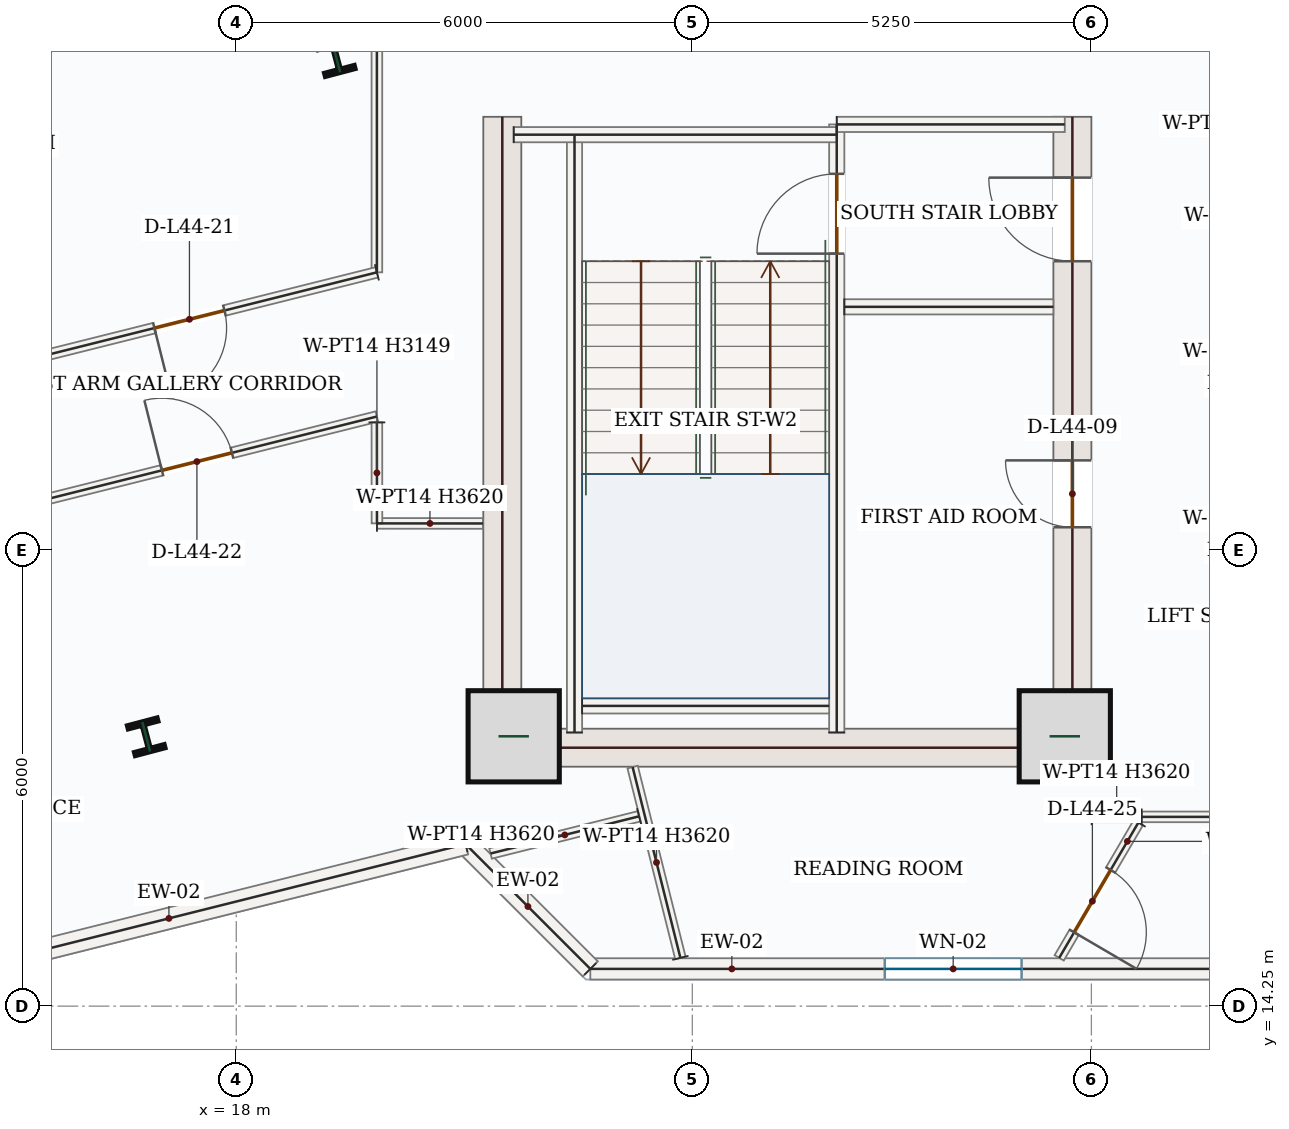
"""IFC4 building model, lengths in metres.
Left out: names, types, materials, properties, quantities, classifications, styles, units other than length and angle.
Written with IfcOpenShell. Run it as: python <this file> out.ifc"""

import sys

from ifc_helpers import new_model, si_unit, direction, frame, frame_2d, origin, origin_2d, place, context, subcontext, project, spatial, rectangle, i_section, extrude, source, transform, mapped, element, fill, save


model = new_model("IFC4")
c1 = context("Model", 3, precision=1e-05, world=origin(), true_north=direction((0.0, 1.0)))
c2 = subcontext(c1, "Body", "Model", "MODEL_VIEW")
j1 = project(units=[si_unit("LENGTHUNIT", "METRE"), si_unit("PLANEANGLEUNIT", "RADIAN")], contexts=[c1])
p1 = place(None, origin())
s1 = spatial("IfcSite", under=j1, at=p1, CompositionType="ELEMENT")
p2 = place(p1, origin())
s2 = spatial("IfcBuilding", under=s1, at=p2, CompositionType="ELEMENT")
p3 = place(p2, frame((0.0, 0.0, 190.2)))
s3 = spatial("IfcBuildingStorey", under=s2, at=p3, CompositionType="ELEMENT", Elevation=190.2)
m1 = source(origin(), c2, "Body", "SweptSolid", [
    extrude(rectangle(XDim=8.55, YDim=0.5, at=frame_2d((4.275, 0.0))), origin(), (0.0, 0.0, 1.0), 3.62),
])
p4 = place(p3, frame((21.5, 17.4, 0.0), z_axis=(0.0, 0.0, 1.0), x_axis=(0.0, 1.0, 0.0)))
e1 = element("IfcWall", 1, at=p4, inside=s3, PredefinedType="SHEAR", context=c2, shape_type="MappedRepresentation", body=[
    mapped(m1, transform((0.0, 0.0, 0.0), x_axis=(1.0, 0.0, 0.0), y_axis=(0.0, 1.0, 0.0), z_axis=(0.0, 0.0, 1.0), scale=1.0)),
])
p5 = place(p3, frame((29.0, 17.4, 0.0), z_axis=(0.0, 0.0, 1.0), x_axis=(0.0, 1.0, 0.0)))
e2 = element("IfcWall", 2, at=p5, inside=s3, PredefinedType="SHEAR", context=c2, shape_type="SweptSolid", body=[
    extrude(rectangle(XDim=8.55, YDim=0.5, at=frame_2d((4.275, 0.0))), origin(), (0.0, 0.0, 1.0), 3.62),
])
p6 = place(p5, frame((6.65, 0.0, 0.0)))
e3 = element("IfcOpeningElement", 3, at=p6, cuts=e2, PredefinedType="OPENING", context=c2, shape_type="SweptSolid", body=[
    extrude(rectangle(XDim=1.1, YDim=2.2, at=frame_2d((0.55, 1.1))), frame((0.0, 0.26, 0.0), z_axis=(0.0, -1.0, 0.0), x_axis=(1.0, 0.0, 0.0)), (0.0, 0.0, 1.0), 0.52),
])
p7 = place(p5, frame((3.15, 0.0, 0.0)))
e4 = element("IfcOpeningElement", 4, at=p7, cuts=e2, PredefinedType="OPENING", context=c2, shape_type="SweptSolid", body=[
    extrude(rectangle(XDim=0.88, YDim=2.1, at=frame_2d((0.44, 1.05))), frame((0.0, 0.26, 0.0), z_axis=(0.0, -1.0, 0.0), x_axis=(1.0, 0.0, 0.0)), (0.0, 0.0, 1.0), 0.52),
])
m2 = source(origin(), c2, "Body", "SweptSolid", [
    extrude(rectangle(XDim=7.0, YDim=0.5, at=frame_2d((3.5, 0.0))), origin(), (0.0, 0.0, 1.0), 3.62),
])
p8 = place(p3, frame((21.75, 17.65, 0.0), z_axis=(0.0, 0.0, 1.0), x_axis=(1.0, 0.0, 0.0)))
e5 = element("IfcWall", 5, at=p8, inside=s3, PredefinedType="SHEAR", context=c2, shape_type="MappedRepresentation", body=[
    mapped(m2, transform((0.0, 0.0, 0.0), x_axis=(1.0, 0.0, 0.0), y_axis=(0.0, 1.0, 0.0), z_axis=(0.0, 0.0, 1.0), scale=1.0)),
])
m3 = source(origin(), c2, "Body", "SweptSolid", [
    extrude(rectangle(XDim=1.2, YDim=1.2, at=origin_2d()), origin(), (0.0, 0.0, 1.0), 3.9),
])
for number, where, z_axis, x_axis in (
    (6, (21.65, 17.8, 0.0), (0.0, 0.0, 1.0), (1.0, 0.0, 0.0)),
    (7, (28.9, 17.8, 0.0), (0.0, 0.0, 1.0), (1.0, 0.0, 0.0)),
):
    element("IfcColumn", number, at=place(p3, frame(where, z_axis=z_axis, x_axis=x_axis)), inside=s3, PredefinedType="COLUMN", context=c2, shape_type="MappedRepresentation", body=[
        mapped(m3, transform((0.0, 0.0, 0.0), x_axis=(1.0, 0.0, 0.0), y_axis=(0.0, 1.0, 0.0), z_axis=(0.0, 0.0, 1.0), scale=1.0)),
    ])
m4 = source(origin(), c2, "Body", "SweptSolid", [
    extrude(i_section(OverallWidth=0.404, OverallDepth=0.407, WebThickness=0.027, FlangeThickness=0.044, FilletRadius=0.018, at=origin_2d()), origin(), (0.0, 0.0, 1.0), 3.9),
])
for number, where, z_axis, x_axis in (
    (8, (19.316, 26.729, 0.0), (0.0, 0.0, 1.0), (0.967, 0.255, 0.0)),
    (9, (16.815, 17.794, 0.0), (0.0, 0.0, 1.0), (0.967, 0.255, 0.0)),
):
    element("IfcColumn", number, at=place(p3, frame(where, z_axis=z_axis, x_axis=x_axis)), inside=s3, PredefinedType="COLUMN", context=c2, shape_type="MappedRepresentation", body=[
        mapped(m4, transform((0.0, 0.0, 0.0), x_axis=(1.0, 0.0, 0.0), y_axis=(0.0, 1.0, 0.0), z_axis=(0.0, 0.0, 1.0), scale=1.0)),
    ])
p9 = place(p3, frame((32.205, 14.74, 0.0), z_axis=(0.0, 0.0, 1.0), x_axis=(-1.0, 0.0, 0.0)))
e10 = element("IfcWall", 10, at=p9, inside=s3, PredefinedType="SOLIDWALL", context=c2, shape_type="SweptSolid", body=[
    extrude(rectangle(XDim=9.547, YDim=0.28, at=frame_2d((4.773, 0.0))), origin(), (0.0, 0.0, 1.0), 3.62),
])
p10 = place(p9, frame((3.873, 0.0, 0.85)))
e11 = element("IfcOpeningElement", 11, at=p10, cuts=e10, PredefinedType="OPENING", context=c2, shape_type="SweptSolid", body=[
    extrude(rectangle(XDim=1.8, YDim=1.75, at=frame_2d((0.9, 0.875))), frame((0.0, 0.15, 0.0), z_axis=(0.0, -1.0, 0.0), x_axis=(1.0, 0.0, 0.0)), (0.0, 0.0, 1.0), 0.3),
])
m5 = source(origin(), c2, "Body", "SweptSolid", [
    extrude(rectangle(XDim=2.322, YDim=0.28, at=frame_2d((1.161, 0.0))), origin(), (0.0, 0.0, 1.0), 3.62),
])
p11 = place(p3, frame((22.658, 14.74, 0.0), z_axis=(0.0, 0.0, 1.0), x_axis=(-0.707106781187, 0.707106781187, 0.0)))
e12 = element("IfcWall", 12, at=p11, inside=s3, PredefinedType="SOLIDWALL", context=c2, shape_type="MappedRepresentation", body=[
    mapped(m5, transform((0.0, 0.0, 0.0), x_axis=(1.0, 0.0, 0.0), y_axis=(0.0, 1.0, 0.0), z_axis=(0.0, 0.0, 1.0), scale=1.0)),
])
m6 = source(origin(), c2, "Body", "SweptSolid", [
    extrude(rectangle(XDim=8.045, YDim=0.28, at=frame_2d((4.023, 0.0))), origin(), (0.0, 0.0, 1.0), 3.62),
])
p12 = place(p3, frame((21.016, 16.382, 0.0), z_axis=(0.0, 0.0, 1.0), x_axis=(-0.970040669564, -0.242942584557, 0.0)))
e13 = element("IfcWall", 13, at=p12, inside=s3, PredefinedType="SOLIDWALL", context=c2, shape_type="MappedRepresentation", body=[
    mapped(m6, transform((0.0, 0.0, 0.0), x_axis=(1.0, 0.0, 0.0), y_axis=(0.0, 1.0, 0.0), z_axis=(0.0, 0.0, 1.0), scale=1.0)),
])
m7 = source(origin(), c2, "Body", "SweptSolid", [
    extrude(rectangle(XDim=7.87, YDim=0.2, at=frame_2d((3.935, 0.0))), origin(), (0.0, 0.0, 1.0), 3.62),
])
p13 = place(p3, frame((22.45, 17.85, 0.0), z_axis=(0.0, 0.0, 1.0), x_axis=(0.0, 1.0, 0.0)))
e14 = element("IfcWall", 14, at=p13, inside=s3, PredefinedType="SOLIDWALL", context=c2, shape_type="MappedRepresentation", body=[
    mapped(m7, transform((0.0, 0.0, 0.0), x_axis=(1.0, 0.0, 0.0), y_axis=(0.0, 1.0, 0.0), z_axis=(0.0, 0.0, 1.0), scale=1.0)),
])
p14 = place(p3, frame((25.9, 17.85, 0.0), z_axis=(0.0, 0.0, 1.0), x_axis=(0.0, 1.0, 0.0)))
e15 = element("IfcWall", 15, at=p14, inside=s3, PredefinedType="SOLIDWALL", context=c2, shape_type="SweptSolid", body=[
    extrude(rectangle(XDim=8.0, YDim=0.2, at=frame_2d((4.0, 0.0))), origin(), (0.0, 0.0, 1.0), 3.62),
])
p15 = place(p14, frame((6.3, 0.0, 0.0)))
e16 = element("IfcOpeningElement", 16, at=p15, cuts=e15, PredefinedType="OPENING", context=c2, shape_type="SweptSolid", body=[
    extrude(rectangle(XDim=1.05, YDim=2.15, at=frame_2d((0.525, 1.075))), frame((0.0, 0.11, 0.0), z_axis=(0.0, -1.0, 0.0), x_axis=(1.0, 0.0, 0.0)), (0.0, 0.0, 1.0), 0.22),
])
m8 = source(origin(), c2, "Body", "SweptSolid", [
    extrude(rectangle(XDim=4.25, YDim=0.2, at=frame_2d((2.125, 0.0))), origin(), (0.0, 0.0, 1.0), 3.62),
])
p16 = place(p3, frame((21.65, 25.715, 0.0), z_axis=(0.0, 0.0, 1.0), x_axis=(1.0, 0.0, 0.0)))
e17 = element("IfcWall", 17, at=p16, inside=s3, PredefinedType="SOLIDWALL", context=c2, shape_type="MappedRepresentation", body=[
    mapped(m8, transform((0.0, 0.0, 0.0), x_axis=(1.0, 0.0, 0.0), y_axis=(0.0, 1.0, 0.0), z_axis=(0.0, 0.0, 1.0), scale=1.0)),
])
m9 = source(origin(), c2, "Body", "SweptSolid", [
    extrude(rectangle(XDim=3.0, YDim=0.2, at=frame_2d((1.5, 0.0))), origin(), (0.0, 0.0, 1.0), 3.62),
])
p17 = place(p3, frame((25.9, 25.85, 0.0), z_axis=(0.0, 0.0, 1.0), x_axis=(1.0, 0.0, 0.0)))
e18 = element("IfcWall", 18, at=p17, inside=s3, PredefinedType="SOLIDWALL", context=c2, shape_type="MappedRepresentation", body=[
    mapped(m9, transform((0.0, 0.0, 0.0), x_axis=(1.0, 0.0, 0.0), y_axis=(0.0, 1.0, 0.0), z_axis=(0.0, 0.0, 1.0), scale=1.0)),
])
m10 = source(origin(), c2, "Body", "SweptSolid", [
    extrude(rectangle(XDim=3.25, YDim=0.2, at=frame_2d((1.625, 0.0))), origin(), (0.0, 0.0, 1.0), 3.62),
])
p18 = place(p3, frame((22.55, 18.2, 0.0), z_axis=(0.0, 0.0, 1.0), x_axis=(1.0, 0.0, 0.0)))
e19 = element("IfcWall", 19, at=p18, inside=s3, PredefinedType="SOLIDWALL", context=c2, shape_type="MappedRepresentation", body=[
    mapped(m10, transform((0.0, 0.0, 0.0), x_axis=(1.0, 0.0, 0.0), y_axis=(0.0, 1.0, 0.0), z_axis=(0.0, 0.0, 1.0), scale=1.0)),
])
m11 = source(origin(), c2, "Body", "SweptSolid", [
    extrude(rectangle(XDim=2.75, YDim=0.2, at=frame_2d((1.375, 0.0))), origin(), (0.0, 0.0, 1.0), 3.62),
])
p19 = place(p3, frame((26.0, 23.45, 0.0), z_axis=(0.0, 0.0, 1.0), x_axis=(1.0, 0.0, 0.0)))
e20 = element("IfcWall", 20, at=p19, inside=s3, PredefinedType="SOLIDWALL", context=c2, shape_type="MappedRepresentation", body=[
    mapped(m11, transform((0.0, 0.0, 0.0), x_axis=(1.0, 0.0, 0.0), y_axis=(0.0, 1.0, 0.0), z_axis=(0.0, 0.0, 1.0), scale=1.0)),
])
m12 = source(origin(), c2, "Body", "SweptSolid", [
    extrude(rectangle(XDim=0.659, YDim=0.14, at=frame_2d((0.329, 0.0))), origin(), (0.0, 0.0, 1.0), 3.62),
])
p20 = place(p3, frame((29.253, 16.74, 0.0), z_axis=(0.0, 0.0, 1.0), x_axis=(0.999999725245, -0.000741289641, 0.0)))
e21 = element("IfcWall", 21, at=p20, inside=s3, PredefinedType="PARTITIONING", context=c2, shape_type="MappedRepresentation", body=[
    mapped(m12, transform((0.0, 0.0, 0.0), x_axis=(1.0, 0.0, 0.0), y_axis=(0.0, 1.0, 0.0), z_axis=(0.0, 0.0, 1.0), scale=1.0)),
])
p21 = place(p3, frame((29.868, 16.665, 0.0), z_axis=(0.0, 0.0, 1.0), x_axis=(-0.505011455642, -0.863112640198, 0.0)))
e22 = element("IfcWall", 22, at=p21, inside=s3, PredefinedType="PARTITIONING", context=c2, shape_type="SweptSolid", body=[
    extrude(rectangle(XDim=2.062, YDim=0.14, at=frame_2d((1.031, 0.0))), origin(), (0.0, 0.0, 1.0), 3.62),
])
p22 = place(p21, frame((0.723, 0.0, 0.0)))
e23 = element("IfcOpeningElement", 23, at=p22, cuts=e22, PredefinedType="OPENING", context=c2, shape_type="SweptSolid", body=[
    extrude(rectangle(XDim=0.95, YDim=2.15, at=frame_2d((0.475, 1.075))), frame((0.0, 0.08, 0.0), z_axis=(0.0, -1.0, 0.0), x_axis=(1.0, 0.0, 0.0)), (0.0, 0.0, 1.0), 0.16),
])
m13 = source(origin(), c2, "Body", "SweptSolid", [
    extrude(rectangle(XDim=2.588, YDim=0.14, at=frame_2d((1.294, 0.0))), origin(), (0.0, 0.0, 1.0), 3.62),
])
p23 = place(p3, frame((23.843, 14.885, 0.0), z_axis=(0.0, 0.0, 1.0), x_axis=(-0.242957412811, 0.97003695577, 0.0)))
e24 = element("IfcWall", 24, at=p23, inside=s3, PredefinedType="PARTITIONING", context=c2, shape_type="MappedRepresentation", body=[
    mapped(m13, transform((0.0, 0.0, 0.0), x_axis=(1.0, 0.0, 0.0), y_axis=(0.0, 1.0, 0.0), z_axis=(0.0, 0.0, 1.0), scale=1.0)),
])
m14 = source(origin(), c2, "Body", "SweptSolid", [
    extrude(rectangle(XDim=1.394, YDim=0.14, at=frame_2d((0.697, 0.0))), origin(), (0.0, 0.0, 1.0), 3.62),
])
p24 = place(p3, frame((19.851, 20.601, 0.0), z_axis=(0.0, 0.0, 1.0), x_axis=(0.999999754632, -0.000700525222, 0.0)))
e25 = element("IfcWall", 25, at=p24, inside=s3, PredefinedType="PARTITIONING", context=c2, shape_type="MappedRepresentation", body=[
    mapped(m14, transform((0.0, 0.0, 0.0), x_axis=(1.0, 0.0, 0.0), y_axis=(0.0, 1.0, 0.0), z_axis=(0.0, 0.0, 1.0), scale=1.0)),
])
m15 = source(origin(), c2, "Body", "SweptSolid", [
    extrude(rectangle(XDim=2.014, YDim=0.14, at=frame_2d((1.007, 0.0))), origin(), (0.0, 0.0, 1.0), 3.62),
])
p25 = place(p3, frame((23.299, 16.747, 0.0), z_axis=(0.0, 0.0, 1.0), x_axis=(-0.970056889313, -0.242877811867, 0.0)))
e26 = element("IfcWall", 26, at=p25, inside=s3, PredefinedType="PARTITIONING", context=c2, shape_type="MappedRepresentation", body=[
    mapped(m15, transform((0.0, 0.0, 0.0), x_axis=(1.0, 0.0, 0.0), y_axis=(0.0, 1.0, 0.0), z_axis=(0.0, 0.0, 1.0), scale=1.0)),
])
p26 = place(p3, frame((10.26, 19.605, 0.0), z_axis=(0.0, 0.0, 1.0), x_axis=(0.970042179759, 0.242936554451, 0.0)))
e27 = element("IfcWall", 27, at=p26, inside=s3, PredefinedType="PARTITIONING", context=c2, shape_type="SweptSolid", body=[
    extrude(rectangle(XDim=9.886, YDim=0.14, at=frame_2d((4.943, 0.0))), origin(), (0.0, 0.0, 1.0), 3.62),
])
p27 = place(p26, frame((6.97, 0.0, 0.0)))
e28 = element("IfcOpeningElement", 28, at=p27, cuts=e27, PredefinedType="OPENING", context=c2, shape_type="SweptSolid", body=[
    extrude(rectangle(XDim=0.95, YDim=2.15, at=frame_2d((0.475, 1.075))), frame((0.0, 0.08, 0.0), z_axis=(0.0, -1.0, 0.0), x_axis=(1.0, 0.0, 0.0)), (0.0, 0.0, 1.0), 0.16),
])
m16 = source(origin(), c2, "Body", "SweptSolid", [
    extrude(rectangle(XDim=1.329, YDim=0.14, at=frame_2d((0.664, 0.0))), origin(), (0.0, 0.0, 1.0), 3.149),
])
p28 = place(p3, frame((19.85, 21.93, 0.0), z_axis=(0.0, 0.0, 1.0), x_axis=(0.00073502369, -0.99999972987, 0.0)))
e29 = element("IfcWall", 29, at=p28, inside=s3, PredefinedType="PARTITIONING", context=c2, shape_type="MappedRepresentation", body=[
    mapped(m16, transform((0.0, 0.0, 0.0), x_axis=(1.0, 0.0, 0.0), y_axis=(0.0, 1.0, 0.0), z_axis=(0.0, 0.0, 1.0), scale=1.0)),
])
m17 = source(origin(), c2, "Body", "SweptSolid", [
    extrude(rectangle(XDim=6.046, YDim=0.14, at=frame_2d((3.023, 0.0))), origin(), (0.0, 0.0, 1.0), 2.766),
])
p29 = place(p3, frame((19.85, 29.95, 0.0), z_axis=(0.0, 0.0, 1.0), x_axis=(0.0, -1.0, 0.0)))
e30 = element("IfcWall", 30, at=p29, inside=s3, PredefinedType="PARTITIONING", context=c2, shape_type="MappedRepresentation", body=[
    mapped(m17, transform((0.0, 0.0, 0.0), x_axis=(1.0, 0.0, 0.0), y_axis=(0.0, 1.0, 0.0), z_axis=(0.0, 0.0, 1.0), scale=1.0)),
])
p30 = place(p3, frame((19.85, 23.904, 0.0), z_axis=(0.0, 0.0, 1.0), x_axis=(-0.97004665335, -0.24291869077, 0.0)))
e31 = element("IfcWall", 31, at=p30, inside=s3, PredefinedType="PARTITIONING", context=c2, shape_type="SweptSolid", body=[
    extrude(rectangle(XDim=10.347, YDim=0.14, at=frame_2d((5.173, 0.0))), origin(), (0.0, 0.0, 1.0), 3.62),
])
p31 = place(p30, frame((2.067, 0.0, 0.0)))
e32 = element("IfcOpeningElement", 32, at=p31, cuts=e31, PredefinedType="OPENING", context=c2, shape_type="SweptSolid", body=[
    extrude(rectangle(XDim=0.95, YDim=2.15, at=frame_2d((0.475, 1.075))), frame((0.0, 0.08, 0.0), z_axis=(0.0, -1.0, 0.0), x_axis=(1.0, 0.0, 0.0)), (0.0, 0.0, 1.0), 0.16),
])
p32 = place(p3, frame((29.912, 16.74, 0.0), z_axis=(0.0, 0.0, 1.0), x_axis=(1.0, 0.0, 0.0)))
e33 = element("IfcWall", 33, at=p32, inside=s3, PredefinedType="PARTITIONING", context=c2, shape_type="SweptSolid", body=[
    extrude(rectangle(XDim=7.806, YDim=0.14, at=frame_2d((3.903, 0.0))), origin(), (0.0, 0.0, 1.0), 3.62),
])
p33 = place(p32, frame((5.348, 0.0, 0.0)))
e34 = element("IfcOpeningElement", 34, at=p33, cuts=e33, PredefinedType="OPENING", context=c2, shape_type="SweptSolid", body=[
    extrude(rectangle(XDim=0.95, YDim=2.15, at=frame_2d((0.475, 1.075))), frame((0.0, 0.08, 0.0), z_axis=(0.0, -1.0, 0.0), x_axis=(1.0, 0.0, 0.0)), (0.0, 0.0, 1.0), 0.16),
])
m18 = source(origin(), c2, "Body", "SweptSolid", [
    extrude(rectangle(XDim=1.8, YDim=1.75, at=frame_2d((0.9, 0.875))), frame((0.0, 0.03, 0.0), z_axis=(0.0, -1.0, 0.0), x_axis=(1.0, 0.0, 0.0)), (0.0, 0.0, 1.0), 0.06),
])
p34 = place(p10, origin())
e35 = element("IfcWindow", 35, at=p34, inside=s3, PartitioningType="DOUBLE_PANEL_VERTICAL", PredefinedType="WINDOW", context=c2, shape_type="MappedRepresentation", body=[
    mapped(m18, transform((0.0, 0.0, 0.0), x_axis=(1.0, 0.0, 0.0), y_axis=(0.0, 1.0, 0.0), z_axis=(0.0, 0.0, 1.0), scale=1.0)),
])
fill(e11, e35)
m19 = source(origin(), c2, "Body", "SweptSolid", [
    extrude(rectangle(XDim=1.05, YDim=2.15, at=frame_2d((0.525, 1.075))), frame((0.0, 0.025, 0.0), z_axis=(0.0, -1.0, 0.0), x_axis=(1.0, 0.0, 0.0)), (0.0, 0.0, 1.0), 0.05),
])
p35 = place(p15, origin())
e36 = element("IfcDoor", 36, at=p35, inside=s3, OperationType="SINGLE_SWING_LEFT", PredefinedType="DOOR", context=c2, shape_type="MappedRepresentation", body=[
    mapped(m19, transform((0.0, 0.0, 0.0), x_axis=(1.0, 0.0, 0.0), y_axis=(0.0, 1.0, 0.0), z_axis=(0.0, 0.0, 1.0), scale=1.0)),
])
fill(e16, e36)
m20 = source(origin(), c2, "Body", "SweptSolid", [
    extrude(rectangle(XDim=1.1, YDim=2.2, at=frame_2d((0.55, 1.1))), frame((0.0, 0.025, 0.0), z_axis=(0.0, -1.0, 0.0), x_axis=(1.0, 0.0, 0.0)), (0.0, 0.0, 1.0), 0.05),
])
p36 = place(p6, origin())
e37 = element("IfcDoor", 37, at=p36, inside=s3, OperationType="SINGLE_SWING_RIGHT", PredefinedType="DOOR", context=c2, shape_type="MappedRepresentation", body=[
    mapped(m20, transform((0.0, 0.0, 0.0), x_axis=(1.0, 0.0, 0.0), y_axis=(0.0, 1.0, 0.0), z_axis=(0.0, 0.0, 1.0), scale=1.0)),
])
fill(e3, e37)
m21 = source(origin(), c2, "Body", "SweptSolid", [
    extrude(rectangle(XDim=0.88, YDim=2.1, at=frame_2d((0.44, 1.05))), frame((0.0, 0.025, 0.0), z_axis=(0.0, -1.0, 0.0), x_axis=(1.0, 0.0, 0.0)), (0.0, 0.0, 1.0), 0.05),
])
p37 = place(p7, origin())
e38 = element("IfcDoor", 38, at=p37, inside=s3, OperationType="SINGLE_SWING_RIGHT", PredefinedType="DOOR", context=c2, shape_type="MappedRepresentation", body=[
    mapped(m21, transform((0.0, 0.0, 0.0), x_axis=(1.0, 0.0, 0.0), y_axis=(0.0, 1.0, 0.0), z_axis=(0.0, 0.0, 1.0), scale=1.0)),
])
fill(e4, e38)
m22 = source(origin(), c2, "Body", "SweptSolid", [
    extrude(rectangle(XDim=0.95, YDim=2.15, at=frame_2d((0.475, 1.075))), frame((0.0, 0.025, 0.0), z_axis=(0.0, -1.0, 0.0), x_axis=(1.0, 0.0, 0.0)), (0.0, 0.0, 1.0), 0.05),
])
p38 = place(p31, origin())
e39 = element("IfcDoor", 39, at=p38, inside=s3, OperationType="SINGLE_SWING_RIGHT", PredefinedType="DOOR", context=c2, shape_type="MappedRepresentation", body=[
    mapped(m22, transform((0.0, 0.0, 0.0), x_axis=(1.0, 0.0, 0.0), y_axis=(0.0, 1.0, 0.0), z_axis=(0.0, 0.0, 1.0), scale=1.0)),
])
fill(e32, e39)
p39 = place(p27, origin())
e40 = element("IfcDoor", 40, at=p39, inside=s3, OperationType="SINGLE_SWING_LEFT", PredefinedType="DOOR", context=c2, shape_type="MappedRepresentation", body=[
    mapped(m22, transform((0.0, 0.0, 0.0), x_axis=(1.0, 0.0, 0.0), y_axis=(0.0, 1.0, 0.0), z_axis=(0.0, 0.0, 1.0), scale=1.0)),
])
fill(e28, e40)
p40 = place(p22, origin())
e41 = element("IfcDoor", 41, at=p40, inside=s3, OperationType="SINGLE_SWING_RIGHT", PredefinedType="DOOR", context=c2, shape_type="MappedRepresentation", body=[
    mapped(m22, transform((0.0, 0.0, 0.0), x_axis=(1.0, 0.0, 0.0), y_axis=(0.0, 1.0, 0.0), z_axis=(0.0, 0.0, 1.0), scale=1.0)),
])
fill(e23, e41)
save(model, sys.argv[1])
